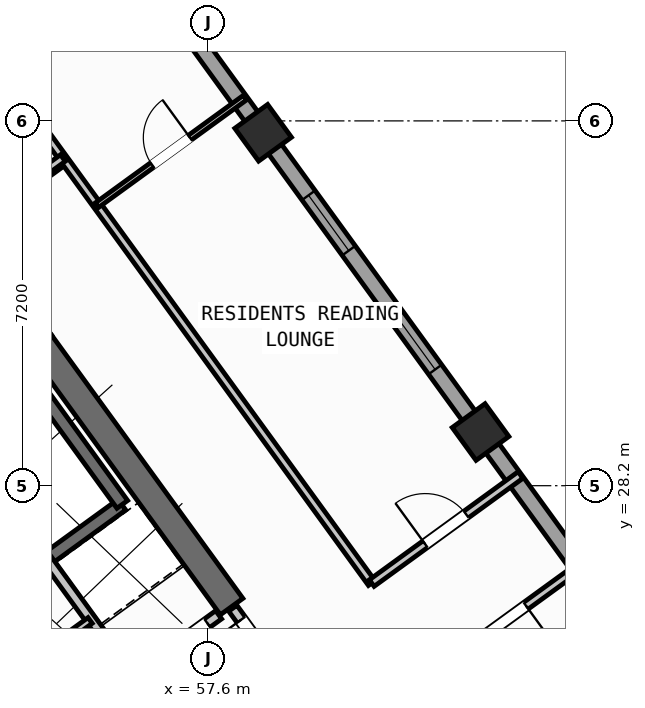
"""IFC4 building model, lengths in metres.
Left out: names, types, materials, properties, quantities, classifications, styles, units other than length and angle.
Written with IfcOpenShell. Run it as: python <this file> out.ifc"""

import sys

from ifc_helpers import new_model, si_unit, direction, frame, frame_2d, origin, origin_2d, place, context, subcontext, project, spatial, rectangle, hollow_rectangle, extrude, source, transform, mapped, element, fill, save


model = new_model("IFC4")
c1 = context("Model", 3, precision=1e-05, world=origin(), true_north=direction((0.0, 1.0)))
c2 = subcontext(c1, "Body", "Model", "MODEL_VIEW")
j1 = project(units=[si_unit("LENGTHUNIT", "METRE"), si_unit("PLANEANGLEUNIT", "RADIAN")], contexts=[c1])
p1 = place(None, origin())
s1 = spatial("IfcSite", under=j1, at=p1, CompositionType="ELEMENT")
p2 = place(p1, origin())
s2 = spatial("IfcBuilding", under=s1, at=p2, CompositionType="ELEMENT")
p3 = place(p2, frame((0.0, 0.0, 204.0)))
s3 = spatial("IfcBuildingStorey", under=s2, at=p3, CompositionType="ELEMENT", Elevation=204.0)
p4 = place(p3, frame((58.064, 25.813, 0.0), z_axis=(0.0, 0.0, 1.0), x_axis=(-0.587764933797, 0.809031756236, 0.0)))
e1 = element("IfcWall", 1, at=p4, inside=s3, PredefinedType="SHEAR", context=c2, shape_type="SweptSolid", body=[
    extrude(rectangle(XDim=6.425, YDim=0.55, at=frame_2d((3.212, 0.0))), origin(), (0.0, 0.0, 1.0), 3.35),
])
m1 = source(origin(), c2, "Body", "SweptSolid", [
    extrude(hollow_rectangle(XDim=0.8, YDim=0.8, WallThickness=0.032, at=origin_2d()), origin(), (0.0, 0.0, 1.0), 3.6),
])
for number, where, z_axis, x_axis in (
    (2, (62.977, 29.259, 0.0), (0.0, 0.0, 1.0), (0.809, 0.588, 0.0)),
    (3, (58.686, 35.165, 0.0), (0.0, 0.0, 1.0), (0.809, 0.588, 0.0)),
):
    element("IfcColumn", number, at=place(p3, frame(where, z_axis=z_axis, x_axis=x_axis)), inside=s3, PredefinedType="COLUMN", context=c2, shape_type="MappedRepresentation", body=[
        mapped(m1, transform((0.0, 0.0, 0.0), scale=1.0)),
    ])
p5 = place(p3, frame((42.207, 31.597, 0.0), z_axis=(0.0, 0.0, 1.0), x_axis=(0.809020333377, 0.587780656523, 0.0)))
e4 = element("IfcWall", 4, at=p5, inside=s3, PredefinedType="STANDARD", context=c2, shape_type="SweptSolid", body=[
    extrude(rectangle(XDim=15.223, YDim=0.32, at=frame_2d((7.611, 0.0))), origin(), (0.0, 0.0, 1.0), 3.35),
])
p6 = place(p5, frame((12.82, 0.0, 0.0)))
e5 = element("IfcOpeningElement", 5, at=p6, cuts=e4, PredefinedType="OPENING", context=c2, shape_type="SweptSolid", body=[
    extrude(rectangle(XDim=1.05, YDim=2.15, at=frame_2d((0.525, 1.075))), frame((0.0, 0.17, 0.0), z_axis=(0.0, -1.0, 0.0), x_axis=(1.0, 0.0, 0.0)), (0.0, 0.0, 1.0), 0.34),
])
p7 = place(p5, frame((1.745, 0.0, 0.9)))
e6 = element("IfcOpeningElement", 6, at=p7, cuts=e4, PredefinedType="OPENING", context=c2, shape_type="SweptSolid", body=[
    extrude(rectangle(XDim=1.65, YDim=1.45, at=frame_2d((0.825, 0.725))), frame((0.0, 0.17, 0.0), z_axis=(0.0, -1.0, 0.0), x_axis=(1.0, 0.0, 0.0)), (0.0, 0.0, 1.0), 0.34),
])
p8 = place(p5, frame((5.985, 0.0, 0.9)))
e7 = element("IfcOpeningElement", 7, at=p8, cuts=e4, PredefinedType="OPENING", context=c2, shape_type="SweptSolid", body=[
    extrude(rectangle(XDim=1.65, YDim=1.45, at=frame_2d((0.825, 0.725))), frame((0.0, 0.17, 0.0), z_axis=(0.0, -1.0, 0.0), x_axis=(1.0, 0.0, 0.0)), (0.0, 0.0, 1.0), 0.34),
])
p9 = place(p5, frame((10.219, 0.0, 1.0)))
e8 = element("IfcOpeningElement", 8, at=p9, cuts=e4, PredefinedType="OPENING", context=c2, shape_type="SweptSolid", body=[
    extrude(rectangle(XDim=0.9, YDim=1.25, at=frame_2d((0.45, 0.625))), frame((0.0, 0.17, 0.0), z_axis=(0.0, -1.0, 0.0), x_axis=(1.0, 0.0, 0.0)), (0.0, 0.0, 1.0), 0.34),
])
p10 = place(p3, frame((54.81, 40.5, 0.0), z_axis=(0.0, 0.0, 1.0), x_axis=(0.587783625747, -0.809018176127, 0.0)))
e9 = element("IfcWall", 9, at=p10, inside=s3, PredefinedType="STANDARD", context=c2, shape_type="SweptSolid", body=[
    extrude(rectangle(XDim=21.587, YDim=0.32, at=frame_2d((10.794, 0.0))), origin(), (0.0, 0.0, 1.0), 2.825),
])
p11 = place(p10, frame((2.343, 0.0, 0.9)))
e10 = element("IfcOpeningElement", 10, at=p11, cuts=e9, PredefinedType="OPENING", context=c2, shape_type="SweptSolid", body=[
    extrude(rectangle(XDim=1.65, YDim=1.45, at=frame_2d((0.825, 0.725))), frame((0.0, 0.17, 0.0), z_axis=(0.0, -1.0, 0.0), x_axis=(1.0, 0.0, 0.0)), (0.0, 0.0, 1.0), 0.34),
])
p12 = place(p10, frame((8.119, 0.0, 0.9)))
e11 = element("IfcOpeningElement", 11, at=p12, cuts=e9, PredefinedType="OPENING", context=c2, shape_type="SweptSolid", body=[
    extrude(rectangle(XDim=1.35, YDim=1.45, at=frame_2d((0.675, 0.725))), frame((0.0, 0.17, 0.0), z_axis=(0.0, -1.0, 0.0), x_axis=(1.0, 0.0, 0.0)), (0.0, 0.0, 1.0), 0.34),
])
p13 = place(p10, frame((11.019, 0.0, 0.9)))
e12 = element("IfcOpeningElement", 12, at=p13, cuts=e9, PredefinedType="OPENING", context=c2, shape_type="SweptSolid", body=[
    extrude(rectangle(XDim=1.35, YDim=1.45, at=frame_2d((0.675, 0.725))), frame((0.0, 0.17, 0.0), z_axis=(0.0, -1.0, 0.0), x_axis=(1.0, 0.0, 0.0)), (0.0, 0.0, 1.0), 0.34),
])
p14 = place(p10, frame((18.634, 0.0, 1.0)))
e13 = element("IfcOpeningElement", 13, at=p14, cuts=e9, PredefinedType="OPENING", context=c2, shape_type="SweptSolid", body=[
    extrude(rectangle(XDim=0.9, YDim=1.25, at=frame_2d((0.45, 0.625))), frame((0.0, 0.17, 0.0), z_axis=(0.0, -1.0, 0.0), x_axis=(1.0, 0.0, 0.0)), (0.0, 0.0, 1.0), 0.34),
])
p15 = place(p3, frame((49.863, 23.44, 0.0), z_axis=(0.0, 0.0, 1.0), x_axis=(0.809003474932, 0.587803859759, 0.0)))
e14 = element("IfcWall", 14, at=p15, inside=s3, PredefinedType="SHEAR", context=c2, shape_type="SweptSolid", body=[
    extrude(rectangle(XDim=7.46, YDim=0.26, at=frame_2d((3.73, 0.0))), origin(), (0.0, 0.0, 1.0), 3.35),
])
p16 = place(p15, frame((0.36, 0.0, 0.0)))
e15 = element("IfcOpeningElement", 15, at=p16, cuts=e14, PredefinedType="OPENING", context=c2, shape_type="SweptSolid", body=[
    extrude(rectangle(XDim=0.86, YDim=2.05, at=frame_2d((0.43, 1.025))), frame((0.0, 0.14, 0.0), z_axis=(0.0, -1.0, 0.0), x_axis=(1.0, 0.0, 0.0)), (0.0, 0.0, 1.0), 0.28),
])
p17 = place(p3, frame((55.906, 27.831, 0.0), z_axis=(0.0, 0.0, 1.0), x_axis=(-0.587804123638, 0.809003283204, 0.0)))
e16 = element("IfcWall", 16, at=p17, inside=s3, PredefinedType="SHEAR", context=c2, shape_type="SweptSolid", body=[
    extrude(rectangle(XDim=3.16, YDim=0.26, at=frame_2d((1.58, 0.0))), origin(), (0.0, 0.0, 1.0), 3.35),
])
p18 = place(p3, frame((56.111, 24.419, 0.0), z_axis=(0.0, 0.0, 1.0), x_axis=(-0.58777848983, 0.809021907548, 0.0)))
e17 = element("IfcWall", 17, at=p18, inside=s3, PredefinedType="STANDARD", context=c2, shape_type="SweptSolid", body=[
    extrude(rectangle(XDim=2.88, YDim=0.2, at=frame_2d((1.44, 0.0))), origin(), (0.0, 0.0, 1.0), 3.34),
])
p19 = place(p3, frame((53.425, 22.468, 0.0), z_axis=(0.0, 0.0, 1.0), x_axis=(0.809024377198, 0.587775090574, 0.0)))
e18 = element("IfcWall", 18, at=p19, inside=s3, PredefinedType="STANDARD", context=c2, shape_type="SweptSolid", body=[
    extrude(rectangle(XDim=5.418, YDim=0.2, at=frame_2d((2.709, 0.0))), origin(), (0.0, 0.0, 1.0), 3.34),
])
p20 = place(p19, frame((4.28, 0.0, 0.0)))
e19 = element("IfcOpeningElement", 19, at=p20, cuts=e18, PredefinedType="OPENING", context=c2, shape_type="SweptSolid", body=[
    extrude(rectangle(XDim=0.86, YDim=2.05, at=frame_2d((0.43, 1.025))), frame((0.0, 0.11, 0.0), z_axis=(0.0, -1.0, 0.0), x_axis=(1.0, 0.0, 0.0)), (0.0, 0.0, 1.0), 0.22),
])
p21 = place(p19, frame((1.45, 0.0, 0.0)))
e20 = element("IfcOpeningElement", 20, at=p21, cuts=e18, PredefinedType="OPENING", context=c2, shape_type="SweptSolid", body=[
    extrude(rectangle(XDim=0.86, YDim=2.05, at=frame_2d((0.43, 1.025))), frame((0.0, 0.11, 0.0), z_axis=(0.0, -1.0, 0.0), x_axis=(1.0, 0.0, 0.0)), (0.0, 0.0, 1.0), 0.22),
])
p22 = place(p3, frame((52.618, 23.612, 0.0), z_axis=(0.0, 0.0, 1.0), x_axis=(0.809009587469, 0.587795446889, 0.0)))
e21 = element("IfcWall", 21, at=p22, inside=s3, PredefinedType="PLUMBINGWALL", context=c2, shape_type="SweptSolid", body=[
    extrude(rectangle(XDim=3.28, YDim=0.14, at=frame_2d((1.64, 0.0))), origin(), (0.0, 0.0, 1.0), 3.34),
])
p23 = place(p22, frame((1.2, 0.0, 0.0)))
e22 = element("IfcOpeningElement", 22, at=p23, cuts=e21, PredefinedType="OPENING", context=c2, shape_type="SweptSolid", body=[
    extrude(rectangle(XDim=0.78, YDim=2.05, at=frame_2d((0.39, 1.025))), frame((0.0, 0.08, 0.0), z_axis=(0.0, -1.0, 0.0), x_axis=(1.0, 0.0, 0.0)), (0.0, 0.0, 1.0), 0.16),
])
p24 = place(p3, frame((59.827, 23.386, 0.0), z_axis=(0.0, 0.0, 1.0), x_axis=(-0.587803840107, 0.809003489211, 0.0)))
e23 = element("IfcWall", 23, at=p24, inside=s3, PredefinedType="STANDARD", context=c2, shape_type="SweptSolid", body=[
    extrude(rectangle(XDim=2.96, YDim=0.2, at=frame_2d((1.48, 0.0))), origin(), (0.0, 0.0, 1.0), 3.34),
])
p25 = place(p24, frame((1.68, 0.0, 0.0)))
e24 = element("IfcOpeningElement", 24, at=p25, cuts=e23, PredefinedType="OPENING", context=c2, shape_type="SweptSolid", body=[
    extrude(rectangle(XDim=1.0, YDim=2.1, at=frame_2d((0.5, 1.05))), frame((0.0, 0.11, 0.0), z_axis=(0.0, -1.0, 0.0), x_axis=(1.0, 0.0, 0.0)), (0.0, 0.0, 1.0), 0.22),
])
p26 = place(p3, frame((52.739, 33.143, 0.0), z_axis=(0.0, 0.0, 1.0), x_axis=(0.809000999347, 0.58780726693, 0.0)))
e25 = element("IfcWall", 25, at=p26, inside=s3, PredefinedType="PARTITIONING", context=c2, shape_type="SweptSolid", body=[
    extrude(rectangle(XDim=2.51, YDim=0.16, at=frame_2d((1.255, 0.0))), origin(), (0.0, 0.0, 1.0), 3.34),
])
p27 = place(p3, frame((60.829, 26.278, 0.0), z_axis=(0.0, 0.0, 1.0), x_axis=(-0.587777474174, 0.809022645451, 0.0)))
e26 = element("IfcWall", 26, at=p27, inside=s3, PredefinedType="PARTITIONING", context=c2, shape_type="SweptSolid", body=[
    extrude(rectangle(XDim=15.1, YDim=0.16, at=frame_2d((7.55, 0.0))), origin(), (0.0, 0.0, 1.0), 3.34),
])
p28 = place(p3, frame((62.093, 24.538, 0.0), z_axis=(0.0, 0.0, 1.0), x_axis=(0.809035546126, 0.58775971715, 0.0)))
e27 = element("IfcWall", 27, at=p28, inside=s3, PredefinedType="PARTITIONING", context=c2, shape_type="SweptSolid", body=[
    extrude(rectangle(XDim=3.63, YDim=0.16, at=frame_2d((1.815, 0.0))), origin(), (0.0, 0.0, 1.0), 3.34),
])
p29 = place(p28, frame((1.2, 0.0, 0.0)))
e28 = element("IfcOpeningElement", 28, at=p29, cuts=e27, PredefinedType="OPENING", context=c2, shape_type="SweptSolid", body=[
    extrude(rectangle(XDim=1.0, YDim=2.1, at=frame_2d((0.5, 1.05))), frame((0.0, 0.09, 0.0), z_axis=(0.0, -1.0, 0.0), x_axis=(1.0, 0.0, 0.0)), (0.0, 0.0, 1.0), 0.18),
])
p30 = place(p3, frame((60.829, 26.278, 0.0), z_axis=(0.0, 0.0, 1.0), x_axis=(0.809003564202, 0.587803736896, 0.0)))
e29 = element("IfcWall", 29, at=p30, inside=s3, PredefinedType="PARTITIONING", context=c2, shape_type="SweptSolid", body=[
    extrude(rectangle(XDim=3.63, YDim=0.16, at=frame_2d((1.815, 0.0))), origin(), (0.0, 0.0, 1.0), 3.34),
])
p31 = place(p30, frame((1.305, 0.0, 0.0)))
e30 = element("IfcOpeningElement", 30, at=p31, cuts=e29, PredefinedType="OPENING", context=c2, shape_type="SweptSolid", body=[
    extrude(rectangle(XDim=1.0, YDim=2.1, at=frame_2d((0.5, 1.05))), frame((0.0, 0.09, 0.0), z_axis=(0.0, -1.0, 0.0), x_axis=(1.0, 0.0, 0.0)), (0.0, 0.0, 1.0), 0.18),
])
p32 = place(p3, frame((55.409, 33.738, 0.0), z_axis=(0.0, 0.0, 1.0), x_axis=(0.809005039917, 0.58780170584, 0.0)))
e31 = element("IfcWall", 31, at=p32, inside=s3, PredefinedType="PARTITIONING", context=c2, shape_type="SweptSolid", body=[
    extrude(rectangle(XDim=3.61, YDim=0.11, at=frame_2d((1.805, 0.0))), origin(), (0.0, 0.0, 1.0), 3.34),
])
p33 = place(p32, frame((1.345, 0.0, 0.0)))
e32 = element("IfcOpeningElement", 32, at=p33, cuts=e31, PredefinedType="OPENING", context=c2, shape_type="SweptSolid", body=[
    extrude(rectangle(XDim=0.92, YDim=2.08, at=frame_2d((0.46, 1.04))), frame((0.0, 0.065, 0.0), z_axis=(0.0, -1.0, 0.0), x_axis=(1.0, 0.0, 0.0)), (0.0, 0.0, 1.0), 0.13),
])
p34 = place(p3, frame((42.866, 26.044, 0.0), z_axis=(0.0, 0.0, 1.0), x_axis=(0.809020254154, 0.587780765566, 0.0)))
e33 = element("IfcWall", 33, at=p34, inside=s3, PredefinedType="PARTITIONING", context=c2, shape_type="SweptSolid", body=[
    extrude(rectangle(XDim=14.67, YDim=0.16, at=frame_2d((7.335, 0.0))), origin(), (0.0, 0.0, 1.0), 3.34),
])
p35 = place(p34, frame((10.2, 0.0, 0.0)))
e34 = element("IfcOpeningElement", 34, at=p35, cuts=e33, PredefinedType="OPENING", context=c2, shape_type="SweptSolid", body=[
    extrude(rectangle(XDim=1.0, YDim=2.1, at=frame_2d((0.5, 1.05))), frame((0.0, 0.09, 0.0), z_axis=(0.0, -1.0, 0.0), x_axis=(1.0, 0.0, 0.0)), (0.0, 0.0, 1.0), 0.18),
])
m2 = source(origin(), c2, "Body", "SweptSolid", [
    extrude(rectangle(XDim=1.35, YDim=1.45, at=frame_2d((0.675, 0.725))), frame((0.0, 0.03, 0.0), z_axis=(0.0, -1.0, 0.0), x_axis=(1.0, 0.0, 0.0)), (0.0, 0.0, 1.0), 0.06),
])
p36 = place(p12, origin())
e35 = element("IfcWindow", 35, at=p36, inside=s3, PartitioningType="SINGLE_PANEL", PredefinedType="WINDOW", context=c2, shape_type="MappedRepresentation", body=[
    mapped(m2, transform((0.0, 0.0, 0.0), scale=1.0)),
])
fill(e11, e35)
p37 = place(p13, origin())
e36 = element("IfcWindow", 36, at=p37, inside=s3, PartitioningType="SINGLE_PANEL", PredefinedType="WINDOW", context=c2, shape_type="MappedRepresentation", body=[
    mapped(m2, transform((0.0, 0.0, 0.0), scale=1.0)),
])
fill(e12, e36)
m3 = source(origin(), c2, "Body", "SweptSolid", [
    extrude(rectangle(XDim=0.86, YDim=2.05, at=frame_2d((0.43, 1.025))), frame((0.0, 0.025, 0.0), z_axis=(0.0, -1.0, 0.0), x_axis=(1.0, 0.0, 0.0)), (0.0, 0.0, 1.0), 0.05),
])
p38 = place(p20, frame((0.86, 0.0, 0.0), z_axis=(0.0, 0.0, 1.0), x_axis=(-1.0, 0.0, 0.0)))
e37 = element("IfcDoor", 37, at=p38, inside=s3, OperationType="SINGLE_SWING_LEFT", PredefinedType="DOOR", context=c2, shape_type="MappedRepresentation", body=[
    mapped(m3, transform((0.0, 0.0, 0.0), scale=1.0)),
])
fill(e19, e37)
m4 = source(origin(), c2, "Body", "SweptSolid", [
    extrude(rectangle(XDim=1.0, YDim=2.1, at=frame_2d((0.5, 1.05))), frame((0.0, 0.025, 0.0), z_axis=(0.0, -1.0, 0.0), x_axis=(1.0, 0.0, 0.0)), (0.0, 0.0, 1.0), 0.05),
])
p39 = place(p25, origin())
e38 = element("IfcDoor", 38, at=p39, inside=s3, OperationType="SINGLE_SWING_RIGHT", PredefinedType="DOOR", context=c2, shape_type="MappedRepresentation", body=[
    mapped(m4, transform((0.0, 0.0, 0.0), scale=1.0)),
])
fill(e24, e38)
p40 = place(p31, origin())
e39 = element("IfcDoor", 39, at=p40, inside=s3, OperationType="SINGLE_SWING_LEFT", PredefinedType="DOOR", context=c2, shape_type="MappedRepresentation", body=[
    mapped(m4, transform((0.0, 0.0, 0.0), scale=1.0)),
])
fill(e30, e39)
m5 = source(origin(), c2, "Body", "SweptSolid", [
    extrude(rectangle(XDim=0.92, YDim=2.08, at=frame_2d((0.46, 1.04))), frame((0.0, 0.025, 0.0), z_axis=(0.0, -1.0, 0.0), x_axis=(1.0, 0.0, 0.0)), (0.0, 0.0, 1.0), 0.05),
])
p41 = place(p33, origin())
e40 = element("IfcDoor", 40, at=p41, inside=s3, OperationType="SINGLE_SWING_RIGHT", PredefinedType="DOOR", context=c2, shape_type="MappedRepresentation", body=[
    mapped(m5, transform((0.0, 0.0, 0.0), scale=1.0)),
])
fill(e32, e40)
p42 = place(p29, frame((1.0, 0.0, 0.0), z_axis=(0.0, 0.0, 1.0), x_axis=(-1.0, 0.0, 0.0)))
e41 = element("IfcDoor", 41, at=p42, inside=s3, OperationType="SINGLE_SWING_LEFT", PredefinedType="DOOR", context=c2, shape_type="MappedRepresentation", body=[
    mapped(m4, transform((0.0, 0.0, 0.0), scale=1.0)),
])
fill(e28, e41)
save(model, sys.argv[1])
